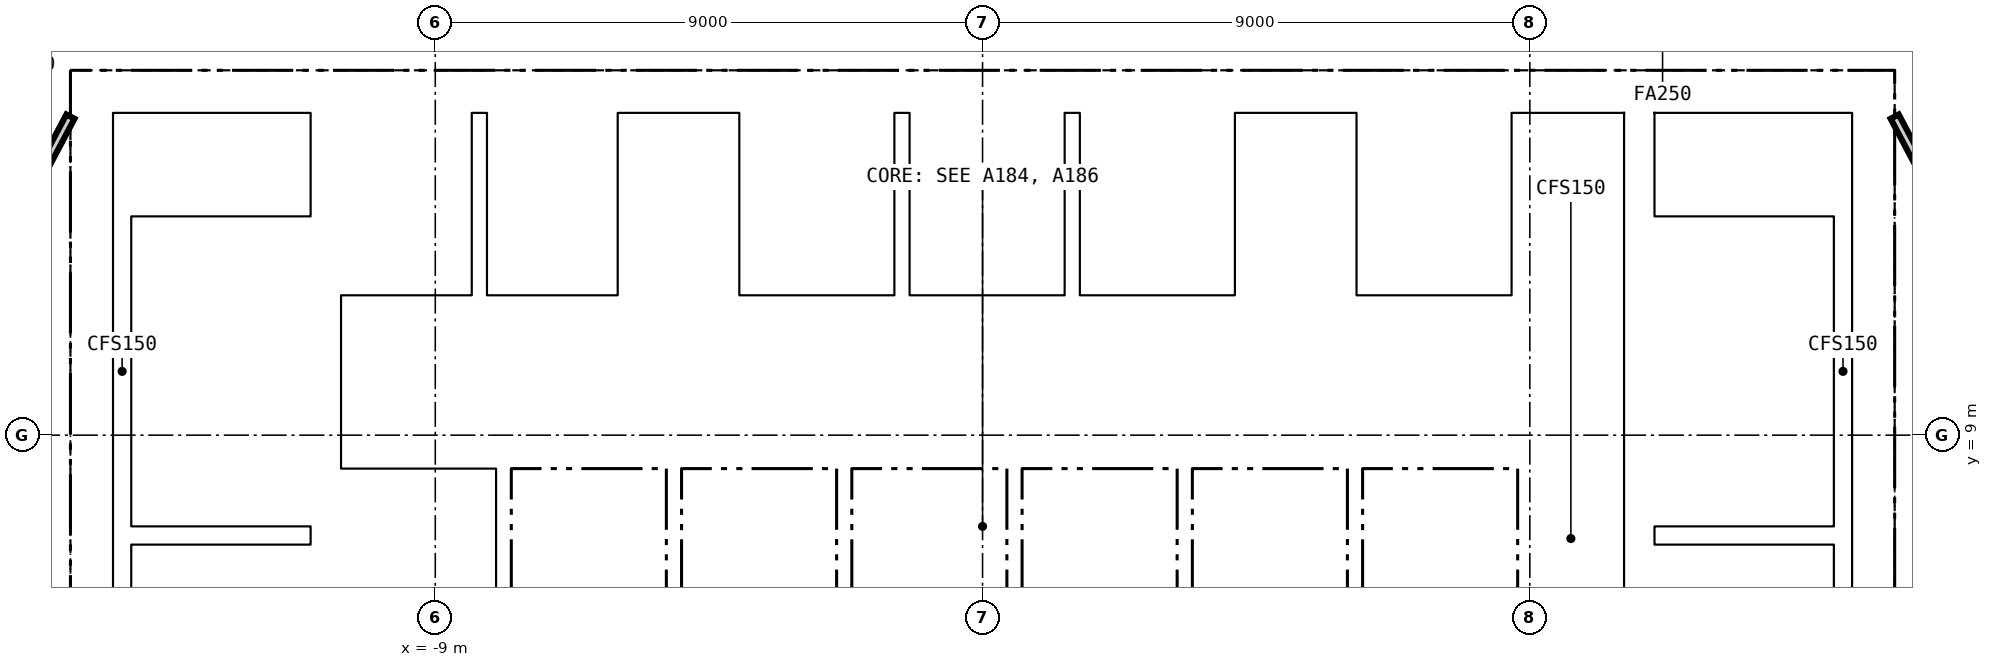
"""IFC4 building model, lengths in metres.
Left out: names, types, materials, properties, quantities, classifications, styles, units other than length and angle.
Written with IfcOpenShell. Run it as: python <this file> out.ifc"""

import sys

from ifc_helpers import new_model, si_unit, direction, frame, frame_2d, origin, place, context, subcontext, project, spatial, rectangle, extrude, element, fill, save


model = new_model("IFC4")
c1 = context("Model", 3, precision=1e-05, world=origin(), true_north=direction((0.0, 1.0)))
c2 = subcontext(c1, "Body", "Model", "MODEL_VIEW")
j1 = project(units=[si_unit("LENGTHUNIT", "METRE"), si_unit("PLANEANGLEUNIT", "RADIAN")], contexts=[c1])
p1 = place(None, origin())
s1 = spatial("IfcSite", under=j1, at=p1, CompositionType="ELEMENT")
p2 = place(p1, origin())
s2 = spatial("IfcBuilding", under=s1, at=p2, CompositionType="ELEMENT")
p3 = place(p2, frame((0.0, 0.0, 170.8)))
s3 = spatial("IfcBuildingStorey", under=s2, at=p3, CompositionType="ELEMENT", Elevation=170.8)
p4 = place(p3, frame((-15.0, 14.65, -0.15), z_axis=(0.0, 0.0, 1.0), x_axis=(1.0, 0.0, 0.0)))
e1 = element("IfcWall", 1, at=p4, inside=s3, PredefinedType="SOLIDWALL", context=c2, shape_type="SweptSolid", body=[
    extrude(rectangle(XDim=30.0, YDim=0.7, at=frame_2d((15.0, 0.0))), origin(), (0.0, 0.0, 1.0), 3.65),
])
p5 = place(p4, frame((9.25, 0.0, 0.15)))
e2 = element("IfcOpeningElement", 2, at=p5, cuts=e1, PredefinedType="OPENING", context=c2, shape_type="SweptSolid", body=[
    extrude(rectangle(XDim=1.5, YDim=2.1, at=frame_2d((0.75, 1.05))), frame((0.0, 0.36, 0.0), z_axis=(0.0, -1.0, 0.0), x_axis=(1.0, 0.0, 0.0)), (0.0, 0.0, 1.0), 0.72),
])
p6 = place(p4, frame((19.4, 0.0, 0.15)))
e3 = element("IfcOpeningElement", 3, at=p6, cuts=e1, PredefinedType="OPENING", context=c2, shape_type="SweptSolid", body=[
    extrude(rectangle(XDim=1.5, YDim=2.1, at=frame_2d((0.75, 1.05))), frame((0.0, 0.36, 0.0), z_axis=(0.0, -1.0, 0.0), x_axis=(1.0, 0.0, 0.0)), (0.0, 0.0, 1.0), 0.72),
])
p7 = place(p4, frame((1.5, 0.0, 0.15)))
e4 = element("IfcOpeningElement", 4, at=p7, cuts=e1, PredefinedType="OPENING", context=c2, shape_type="SweptSolid", body=[
    extrude(rectangle(XDim=1.2, YDim=2.1, at=frame_2d((0.6, 1.05))), frame((0.0, 0.36, 0.0), z_axis=(0.0, -1.0, 0.0), x_axis=(1.0, 0.0, 0.0)), (0.0, 0.0, 1.0), 0.72),
])
p8 = place(p4, frame((27.3, 0.0, 0.15)))
e5 = element("IfcOpeningElement", 5, at=p8, cuts=e1, PredefinedType="OPENING", context=c2, shape_type="SweptSolid", body=[
    extrude(rectangle(XDim=1.2, YDim=2.1, at=frame_2d((0.6, 1.05))), frame((0.0, 0.36, 0.0), z_axis=(0.0, -1.0, 0.0), x_axis=(1.0, 0.0, 0.0)), (0.0, 0.0, 1.0), 0.72),
])
for number, where, z_axis, x_axis in (
    (6, (-14.65, 0.7, -0.15), (0.0, 0.0, 1.0), (0.0, 1.0, 0.0)),
    (7, (14.65, 0.7, -0.15), (0.0, 0.0, 1.0), (0.0, 1.0, 0.0)),
):
    element("IfcWall", number, at=place(p3, frame(where, z_axis=z_axis, x_axis=x_axis)), inside=s3, PredefinedType="SOLIDWALL", context=c2, shape_type="SweptSolid", body=[
        extrude(rectangle(XDim=13.6, YDim=0.7, at=frame_2d((6.8, 0.0))), origin(), (0.0, 0.0, 1.0), 3.65),
    ])
for number, where, z_axis, x_axis in (
    (8, (-10.8, 0.7, -0.15), (0.0, 0.0, 1.0), (0.0, 1.0, 0.0)),
    (9, (10.8, 0.7, -0.15), (0.0, 0.0, 1.0), (0.0, 1.0, 0.0)),
):
    element("IfcWall", number, at=place(p3, frame(where, z_axis=z_axis, x_axis=x_axis)), inside=s3, PredefinedType="SOLIDWALL", context=c2, shape_type="SweptSolid", body=[
        extrude(rectangle(XDim=13.6, YDim=0.5, at=frame_2d((6.8, 0.0))), origin(), (0.0, 0.0, 1.0), 3.65),
    ])
p9 = place(p3, frame((-10.55, 8.55, 0.0), z_axis=(0.0, 0.0, 1.0), x_axis=(1.0, 0.0, 0.0)))
e10 = element("IfcWall", 10, at=p9, inside=s3, PredefinedType="PARTITIONING", context=c2, shape_type="SweptSolid", body=[
    extrude(rectangle(XDim=21.1, YDim=0.2, at=frame_2d((10.55, 0.0))), origin(), (0.0, 0.0, 1.0), 3.5),
])
p10 = place(p9, frame((0.675, 0.0, 0.0)))
e11 = element("IfcOpeningElement", 11, at=p10, cuts=e10, PredefinedType="OPENING", context=c2, shape_type="SweptSolid", body=[
    extrude(rectangle(XDim=1.2, YDim=2.1, at=frame_2d((0.6, 1.05))), frame((0.0, 0.11, 0.0), z_axis=(0.0, -1.0, 0.0), x_axis=(1.0, 0.0, 0.0)), (0.0, 0.0, 1.0), 0.22),
])
p11 = place(p9, frame((3.475, 0.0, 0.0)))
e12 = element("IfcOpeningElement", 12, at=p11, cuts=e10, PredefinedType="OPENING", context=c2, shape_type="SweptSolid", body=[
    extrude(rectangle(XDim=1.2, YDim=2.1, at=frame_2d((0.6, 1.05))), frame((0.0, 0.11, 0.0), z_axis=(0.0, -1.0, 0.0), x_axis=(1.0, 0.0, 0.0)), (0.0, 0.0, 1.0), 0.22),
])
p12 = place(p9, frame((6.275, 0.0, 0.0)))
e13 = element("IfcOpeningElement", 13, at=p12, cuts=e10, PredefinedType="OPENING", context=c2, shape_type="SweptSolid", body=[
    extrude(rectangle(XDim=1.2, YDim=2.1, at=frame_2d((0.6, 1.05))), frame((0.0, 0.11, 0.0), z_axis=(0.0, -1.0, 0.0), x_axis=(1.0, 0.0, 0.0)), (0.0, 0.0, 1.0), 0.22),
])
p13 = place(p9, frame((9.075, 0.0, 0.0)))
e14 = element("IfcOpeningElement", 14, at=p13, cuts=e10, PredefinedType="OPENING", context=c2, shape_type="SweptSolid", body=[
    extrude(rectangle(XDim=1.2, YDim=2.1, at=frame_2d((0.6, 1.05))), frame((0.0, 0.11, 0.0), z_axis=(0.0, -1.0, 0.0), x_axis=(1.0, 0.0, 0.0)), (0.0, 0.0, 1.0), 0.22),
])
p14 = place(p9, frame((11.875, 0.0, 0.0)))
e15 = element("IfcOpeningElement", 15, at=p14, cuts=e10, PredefinedType="OPENING", context=c2, shape_type="SweptSolid", body=[
    extrude(rectangle(XDim=1.2, YDim=2.1, at=frame_2d((0.6, 1.05))), frame((0.0, 0.11, 0.0), z_axis=(0.0, -1.0, 0.0), x_axis=(1.0, 0.0, 0.0)), (0.0, 0.0, 1.0), 0.22),
])
p15 = place(p9, frame((14.675, 0.0, 0.0)))
e16 = element("IfcOpeningElement", 16, at=p15, cuts=e10, PredefinedType="OPENING", context=c2, shape_type="SweptSolid", body=[
    extrude(rectangle(XDim=1.2, YDim=2.1, at=frame_2d((0.6, 1.05))), frame((0.0, 0.11, 0.0), z_axis=(0.0, -1.0, 0.0), x_axis=(1.0, 0.0, 0.0)), (0.0, 0.0, 1.0), 0.22),
])
p16 = place(p9, frame((17.475, 0.0, 0.0)))
e17 = element("IfcOpeningElement", 17, at=p16, cuts=e10, PredefinedType="OPENING", context=c2, shape_type="SweptSolid", body=[
    extrude(rectangle(XDim=1.2, YDim=2.1, at=frame_2d((0.6, 1.05))), frame((0.0, 0.11, 0.0), z_axis=(0.0, -1.0, 0.0), x_axis=(1.0, 0.0, 0.0)), (0.0, 0.0, 1.0), 0.22),
])
p17 = place(p9, frame((19.9, 0.0, 0.0)))
e18 = element("IfcOpeningElement", 18, at=p17, cuts=e10, PredefinedType="OPENING", context=c2, shape_type="SweptSolid", body=[
    extrude(rectangle(XDim=0.9, YDim=2.1, at=frame_2d((0.45, 1.05))), frame((0.0, 0.11, 0.0), z_axis=(0.0, -1.0, 0.0), x_axis=(1.0, 0.0, 0.0)), (0.0, 0.0, 1.0), 0.22),
])
p18 = place(p3, frame((-10.55, 11.2, 0.0), z_axis=(0.0, 0.0, 1.0), x_axis=(1.0, 0.0, 0.0)))
e19 = element("IfcWall", 19, at=p18, inside=s3, PredefinedType="PARTITIONING", context=c2, shape_type="SweptSolid", body=[
    extrude(rectangle(XDim=4.8, YDim=0.2, at=frame_2d((2.4, 0.0))), origin(), (0.0, 0.0, 1.0), 3.5),
])
p19 = place(p18, frame((0.525, 0.0, 0.0)))
e20 = element("IfcOpeningElement", 20, at=p19, cuts=e19, PredefinedType="OPENING", context=c2, shape_type="SweptSolid", body=[
    extrude(rectangle(XDim=1.1, YDim=2.1, at=frame_2d((0.55, 1.05))), frame((0.0, 0.11, 0.0), z_axis=(0.0, -1.0, 0.0), x_axis=(1.0, 0.0, 0.0)), (0.0, 0.0, 1.0), 0.22),
])
p20 = place(p18, frame((2.925, 0.0, 0.0)))
e21 = element("IfcOpeningElement", 21, at=p20, cuts=e19, PredefinedType="OPENING", context=c2, shape_type="SweptSolid", body=[
    extrude(rectangle(XDim=1.1, YDim=2.1, at=frame_2d((0.55, 1.05))), frame((0.0, 0.11, 0.0), z_axis=(0.0, -1.0, 0.0), x_axis=(1.0, 0.0, 0.0)), (0.0, 0.0, 1.0), 0.22),
])
p21 = place(p3, frame((-4.25, 11.2, 0.0), z_axis=(0.0, 0.0, 1.0), x_axis=(1.0, 0.0, 0.0)))
e22 = element("IfcWall", 22, at=p21, inside=s3, PredefinedType="PARTITIONING", context=c2, shape_type="SweptSolid", body=[
    extrude(rectangle(XDim=8.65, YDim=0.2, at=frame_2d((4.325, 0.0))), origin(), (0.0, 0.0, 1.0), 3.5),
])
p22 = place(p21, frame((0.825, 0.0, 0.0)))
e23 = element("IfcOpeningElement", 23, at=p22, cuts=e22, PredefinedType="OPENING", context=c2, shape_type="SweptSolid", body=[
    extrude(rectangle(XDim=1.4, YDim=2.1, at=frame_2d((0.7, 1.05))), frame((0.0, 0.11, 0.0), z_axis=(0.0, -1.0, 0.0), x_axis=(1.0, 0.0, 0.0)), (0.0, 0.0, 1.0), 0.22),
])
p23 = place(p21, frame((3.625, 0.0, 0.0)))
e24 = element("IfcOpeningElement", 24, at=p23, cuts=e22, PredefinedType="OPENING", context=c2, shape_type="SweptSolid", body=[
    extrude(rectangle(XDim=1.4, YDim=2.1, at=frame_2d((0.7, 1.05))), frame((0.0, 0.11, 0.0), z_axis=(0.0, -1.0, 0.0), x_axis=(1.0, 0.0, 0.0)), (0.0, 0.0, 1.0), 0.22),
])
p24 = place(p3, frame((5.9, 11.2, 0.0), z_axis=(0.0, 0.0, 1.0), x_axis=(1.0, 0.0, 0.0)))
e25 = element("IfcWall", 25, at=p24, inside=s3, PredefinedType="PARTITIONING", context=c2, shape_type="SweptSolid", body=[
    extrude(rectangle(XDim=4.65, YDim=0.2, at=frame_2d((2.325, 0.0))), origin(), (0.0, 0.0, 1.0), 3.5),
])
p25 = place(p24, frame((3.4, 0.0, 0.0)))
e26 = element("IfcOpeningElement", 26, at=p25, cuts=e25, PredefinedType="OPENING", context=c2, shape_type="SweptSolid", body=[
    extrude(rectangle(XDim=0.9, YDim=2.1, at=frame_2d((0.45, 1.05))), frame((0.0, 0.11, 0.0), z_axis=(0.0, -1.0, 0.0), x_axis=(1.0, 0.0, 0.0)), (0.0, 0.0, 1.0), 0.22),
])
p26 = place(p3, frame((-4.125, 8.65, 0.0), z_axis=(0.0, 0.0, 1.0), x_axis=(0.0, 1.0, 0.0)))
e27 = element("IfcWall", 27, at=p26, inside=s3, PredefinedType="PARTITIONING", context=c2, shape_type="SweptSolid", body=[
    extrude(rectangle(XDim=2.45, YDim=0.25, at=frame_2d((1.225, 0.0))), origin(), (0.0, 0.0, 1.0), 3.5),
])
p27 = place(p26, frame((0.625, 0.0, 0.0)))
e28 = element("IfcOpeningElement", 28, at=p27, cuts=e27, PredefinedType="OPENING", context=c2, shape_type="SweptSolid", body=[
    extrude(rectangle(XDim=1.2, YDim=2.1, at=frame_2d((0.6, 1.05))), frame((0.0, 0.135, 0.0), z_axis=(0.0, -1.0, 0.0), x_axis=(1.0, 0.0, 0.0)), (0.0, 0.0, 1.0), 0.27),
])
for number, where, z_axis, x_axis in (
    (29, (-7.875, 6.15, 0.0), (0.0, 0.0, 1.0), (0.0, 1.0, 0.0)),
    (30, (-5.075, 6.15, 0.0), (0.0, 0.0, 1.0), (0.0, 1.0, 0.0)),
    (31, (-2.275, 6.15, 0.0), (0.0, 0.0, 1.0), (0.0, 1.0, 0.0)),
    (32, (0.525, 6.15, 0.0), (0.0, 0.0, 1.0), (0.0, 1.0, 0.0)),
    (33, (3.325, 6.15, 0.0), (0.0, 0.0, 1.0), (0.0, 1.0, 0.0)),
    (34, (6.125, 6.15, 0.0), (0.0, 0.0, 1.0), (0.0, 1.0, 0.0)),
    (35, (8.925, 6.15, 0.0), (0.0, 0.0, 1.0), (0.0, 1.0, 0.0)),
):
    element("IfcWall", number, at=place(p3, frame(where, z_axis=z_axis, x_axis=x_axis)), inside=s3, PredefinedType="PARTITIONING", context=c2, shape_type="SweptSolid", body=[
        extrude(rectangle(XDim=2.3, YDim=0.25, at=frame_2d((1.15, 0.0))), origin(), (0.0, 0.0, 1.0), 3.5),
    ])
for number, where, z_axis, x_axis in (
    (36, (-8.275, 11.3, 0.0), (0.0, 0.0, 1.0), (0.0, 1.0, 0.0)),
    (37, (-5.875, 11.3, 0.0), (0.0, 0.0, 1.0), (0.0, 1.0, 0.0)),
    (38, (-4.125, 11.3, 0.0), (0.0, 0.0, 1.0), (0.0, 1.0, 0.0)),
    (39, (-1.325, 11.3, 0.0), (0.0, 0.0, 1.0), (0.0, 1.0, 0.0)),
    (40, (1.475, 11.3, 0.0), (0.0, 0.0, 1.0), (0.0, 1.0, 0.0)),
    (41, (4.275, 11.3, 0.0), (0.0, 0.0, 1.0), (0.0, 1.0, 0.0)),
    (42, (6.025, 11.3, 0.0), (0.0, 0.0, 1.0), (0.0, 1.0, 0.0)),
    (43, (8.825, 11.3, 0.0), (0.0, 0.0, 1.0), (0.0, 1.0, 0.0)),
):
    element("IfcWall", number, at=place(p3, frame(where, z_axis=z_axis, x_axis=x_axis)), inside=s3, PredefinedType="PARTITIONING", context=c2, shape_type="SweptSolid", body=[
        extrude(rectangle(XDim=3.0, YDim=0.25, at=frame_2d((1.5, 0.0))), origin(), (0.0, 0.0, 1.0), 3.5),
    ])
p28 = place(p3, frame((-14.0, 7.35, 0.0), z_axis=(0.0, 0.0, 1.0), x_axis=(1.0, 0.0, 0.0)))
e44 = element("IfcWall", 44, at=p28, inside=s3, PredefinedType="SOLIDWALL", context=c2, shape_type="SweptSolid", body=[
    extrude(rectangle(XDim=2.95, YDim=0.3, at=frame_2d((1.475, 0.0))), origin(), (0.0, 0.0, 1.0), 3.5),
])
p29 = place(p3, frame((-14.15, 0.7, 0.0), z_axis=(0.0, 0.0, 1.0), x_axis=(0.0, 1.0, 0.0)))
e45 = element("IfcWall", 45, at=p29, inside=s3, PredefinedType="SOLIDWALL", context=c2, shape_type="SweptSolid", body=[
    extrude(rectangle(XDim=13.6, YDim=0.3, at=frame_2d((6.8, 0.0))), origin(), (0.0, 0.0, 1.0), 3.5),
])
p30 = place(p3, frame((11.05, 7.35, 0.0), z_axis=(0.0, 0.0, 1.0), x_axis=(1.0, 0.0, 0.0)))
e46 = element("IfcWall", 46, at=p30, inside=s3, PredefinedType="SOLIDWALL", context=c2, shape_type="SweptSolid", body=[
    extrude(rectangle(XDim=2.95, YDim=0.3, at=frame_2d((1.475, 0.0))), origin(), (0.0, 0.0, 1.0), 3.5),
])
p31 = place(p3, frame((14.15, 0.7, 0.0), z_axis=(0.0, 0.0, 1.0), x_axis=(0.0, 1.0, 0.0)))
e47 = element("IfcWall", 47, at=p31, inside=s3, PredefinedType="SOLIDWALL", context=c2, shape_type="SweptSolid", body=[
    extrude(rectangle(XDim=13.6, YDim=0.3, at=frame_2d((6.8, 0.0))), origin(), (0.0, 0.0, 1.0), 3.5),
])
p32 = place(p3, frame((-15.0, 14.239, 0.0), z_axis=(0.0, 0.0, 1.0), x_axis=(-0.467834708812, -0.88381597928, 0.0)))
e48 = element("IfcWall", 48, at=p32, inside=s3, PredefinedType="PARTITIONING", context=c2, shape_type="SweptSolid", body=[
    extrude(rectangle(XDim=7.406, YDim=0.15, at=frame_2d((3.703, 0.0))), origin(), (0.0, 0.0, 1.0), 2.741),
])
p33 = place(p32, frame((3.203, 0.0, 0.0)))
e49 = element("IfcOpeningElement", 49, at=p33, cuts=e48, PredefinedType="OPENING", context=c2, shape_type="SweptSolid", body=[
    extrude(rectangle(XDim=1.0, YDim=2.1, at=frame_2d((0.5, 1.05))), frame((0.0, 0.085, 0.0), z_axis=(0.0, -1.0, 0.0), x_axis=(1.0, 0.0, 0.0)), (0.0, 0.0, 1.0), 0.17),
])
p34 = place(p3, frame((18.5, 7.627, 0.0), z_axis=(0.0, 0.0, 1.0), x_axis=(-0.467835241243, 0.883815697446, 0.0)))
e50 = element("IfcWall", 50, at=p34, inside=s3, PredefinedType="PARTITIONING", context=c2, shape_type="SweptSolid", body=[
    extrude(rectangle(XDim=7.481, YDim=0.15, at=frame_2d((3.741, 0.0))), origin(), (0.0, 0.0, 1.0), 2.741),
])
p35 = place(p34, frame((3.24, 0.0, 0.0)))
e51 = element("IfcOpeningElement", 51, at=p35, cuts=e50, PredefinedType="OPENING", context=c2, shape_type="SweptSolid", body=[
    extrude(rectangle(XDim=1.0, YDim=2.1, at=frame_2d((0.5, 1.05))), frame((0.0, 0.085, 0.0), z_axis=(0.0, -1.0, 0.0), x_axis=(1.0, 0.0, 0.0)), (0.0, 0.0, 1.0), 0.17),
])
p36 = place(p27, origin())
e52 = element("IfcDoor", 52, at=p36, inside=s3, OperationType="SINGLE_SWING_LEFT", PredefinedType="DOOR", context=c2, shape_type="SweptSolid", body=[
    extrude(rectangle(XDim=1.2, YDim=2.1, at=frame_2d((0.6, 1.05))), frame((0.0, 0.025, 0.0), z_axis=(0.0, -1.0, 0.0), x_axis=(1.0, 0.0, 0.0)), (0.0, 0.0, 1.0), 0.05),
])
fill(e28, e52)
p37 = place(p10, origin())
e53 = element("IfcDoor", 53, at=p37, inside=s3, OperationType="DOUBLE_DOOR_SLIDING", PredefinedType="DOOR", context=c2, shape_type="SweptSolid", body=[
    extrude(rectangle(XDim=1.2, YDim=2.1, at=frame_2d((0.6, 1.05))), frame((0.0, 0.025, 0.0), z_axis=(0.0, -1.0, 0.0), x_axis=(1.0, 0.0, 0.0)), (0.0, 0.0, 1.0), 0.05),
])
fill(e11, e53)
p38 = place(p11, origin())
e54 = element("IfcDoor", 54, at=p38, inside=s3, OperationType="DOUBLE_DOOR_SLIDING", PredefinedType="DOOR", context=c2, shape_type="SweptSolid", body=[
    extrude(rectangle(XDim=1.2, YDim=2.1, at=frame_2d((0.6, 1.05))), frame((0.0, 0.025, 0.0), z_axis=(0.0, -1.0, 0.0), x_axis=(1.0, 0.0, 0.0)), (0.0, 0.0, 1.0), 0.05),
])
fill(e12, e54)
p39 = place(p12, origin())
e55 = element("IfcDoor", 55, at=p39, inside=s3, OperationType="DOUBLE_DOOR_SLIDING", PredefinedType="DOOR", context=c2, shape_type="SweptSolid", body=[
    extrude(rectangle(XDim=1.2, YDim=2.1, at=frame_2d((0.6, 1.05))), frame((0.0, 0.025, 0.0), z_axis=(0.0, -1.0, 0.0), x_axis=(1.0, 0.0, 0.0)), (0.0, 0.0, 1.0), 0.05),
])
fill(e13, e55)
p40 = place(p13, origin())
e56 = element("IfcDoor", 56, at=p40, inside=s3, OperationType="DOUBLE_DOOR_SLIDING", PredefinedType="DOOR", context=c2, shape_type="SweptSolid", body=[
    extrude(rectangle(XDim=1.2, YDim=2.1, at=frame_2d((0.6, 1.05))), frame((0.0, 0.025, 0.0), z_axis=(0.0, -1.0, 0.0), x_axis=(1.0, 0.0, 0.0)), (0.0, 0.0, 1.0), 0.05),
])
fill(e14, e56)
p41 = place(p14, origin())
e57 = element("IfcDoor", 57, at=p41, inside=s3, OperationType="DOUBLE_DOOR_SLIDING", PredefinedType="DOOR", context=c2, shape_type="SweptSolid", body=[
    extrude(rectangle(XDim=1.2, YDim=2.1, at=frame_2d((0.6, 1.05))), frame((0.0, 0.025, 0.0), z_axis=(0.0, -1.0, 0.0), x_axis=(1.0, 0.0, 0.0)), (0.0, 0.0, 1.0), 0.05),
])
fill(e15, e57)
p42 = place(p15, origin())
e58 = element("IfcDoor", 58, at=p42, inside=s3, OperationType="DOUBLE_DOOR_SLIDING", PredefinedType="DOOR", context=c2, shape_type="SweptSolid", body=[
    extrude(rectangle(XDim=1.2, YDim=2.1, at=frame_2d((0.6, 1.05))), frame((0.0, 0.025, 0.0), z_axis=(0.0, -1.0, 0.0), x_axis=(1.0, 0.0, 0.0)), (0.0, 0.0, 1.0), 0.05),
])
fill(e16, e58)
p43 = place(p16, origin())
e59 = element("IfcDoor", 59, at=p43, inside=s3, OperationType="DOUBLE_DOOR_SLIDING", PredefinedType="DOOR", context=c2, shape_type="SweptSolid", body=[
    extrude(rectangle(XDim=1.2, YDim=2.1, at=frame_2d((0.6, 1.05))), frame((0.0, 0.025, 0.0), z_axis=(0.0, -1.0, 0.0), x_axis=(1.0, 0.0, 0.0)), (0.0, 0.0, 1.0), 0.05),
])
fill(e17, e59)
p44 = place(p17, origin())
e60 = element("IfcDoor", 60, at=p44, inside=s3, OperationType="SINGLE_SWING_RIGHT", PredefinedType="DOOR", context=c2, shape_type="SweptSolid", body=[
    extrude(rectangle(XDim=0.9, YDim=2.1, at=frame_2d((0.45, 1.05))), frame((0.0, 0.025, 0.0), z_axis=(0.0, -1.0, 0.0), x_axis=(1.0, 0.0, 0.0)), (0.0, 0.0, 1.0), 0.05),
])
fill(e18, e60)
p45 = place(p19, origin())
e61 = element("IfcDoor", 61, at=p45, inside=s3, OperationType="DOUBLE_DOOR_SLIDING", PredefinedType="DOOR", context=c2, shape_type="SweptSolid", body=[
    extrude(rectangle(XDim=1.1, YDim=2.1, at=frame_2d((0.55, 1.05))), frame((0.0, 0.025, 0.0), z_axis=(0.0, -1.0, 0.0), x_axis=(1.0, 0.0, 0.0)), (0.0, 0.0, 1.0), 0.05),
])
fill(e20, e61)
p46 = place(p20, origin())
e62 = element("IfcDoor", 62, at=p46, inside=s3, OperationType="DOUBLE_DOOR_SLIDING", PredefinedType="DOOR", context=c2, shape_type="SweptSolid", body=[
    extrude(rectangle(XDim=1.1, YDim=2.1, at=frame_2d((0.55, 1.05))), frame((0.0, 0.025, 0.0), z_axis=(0.0, -1.0, 0.0), x_axis=(1.0, 0.0, 0.0)), (0.0, 0.0, 1.0), 0.05),
])
fill(e21, e62)
p47 = place(p22, origin())
e63 = element("IfcDoor", 63, at=p47, inside=s3, OperationType="DOUBLE_DOOR_SLIDING", PredefinedType="DOOR", context=c2, shape_type="SweptSolid", body=[
    extrude(rectangle(XDim=1.4, YDim=2.1, at=frame_2d((0.7, 1.05))), frame((0.0, 0.025, 0.0), z_axis=(0.0, -1.0, 0.0), x_axis=(1.0, 0.0, 0.0)), (0.0, 0.0, 1.0), 0.05),
])
fill(e23, e63)
p48 = place(p23, origin())
e64 = element("IfcDoor", 64, at=p48, inside=s3, OperationType="DOUBLE_DOOR_SLIDING", PredefinedType="DOOR", context=c2, shape_type="SweptSolid", body=[
    extrude(rectangle(XDim=1.4, YDim=2.1, at=frame_2d((0.7, 1.05))), frame((0.0, 0.025, 0.0), z_axis=(0.0, -1.0, 0.0), x_axis=(1.0, 0.0, 0.0)), (0.0, 0.0, 1.0), 0.05),
])
fill(e24, e64)
p49 = place(p25, origin())
e65 = element("IfcDoor", 65, at=p49, inside=s3, OperationType="SINGLE_SWING_LEFT", PredefinedType="DOOR", context=c2, shape_type="SweptSolid", body=[
    extrude(rectangle(XDim=0.9, YDim=2.1, at=frame_2d((0.45, 1.05))), frame((0.0, 0.025, 0.0), z_axis=(0.0, -1.0, 0.0), x_axis=(1.0, 0.0, 0.0)), (0.0, 0.0, 1.0), 0.05),
])
fill(e26, e65)
p50 = place(p5, origin())
e66 = element("IfcDoor", 66, at=p50, inside=s3, OperationType="DOUBLE_DOOR_SINGLE_SWING", PredefinedType="DOOR", context=c2, shape_type="SweptSolid", body=[
    extrude(rectangle(XDim=1.5, YDim=2.1, at=frame_2d((0.75, 1.05))), frame((0.0, 0.025, 0.0), z_axis=(0.0, -1.0, 0.0), x_axis=(1.0, 0.0, 0.0)), (0.0, 0.0, 1.0), 0.05),
])
fill(e2, e66)
p51 = place(p6, origin())
e67 = element("IfcDoor", 67, at=p51, inside=s3, OperationType="DOUBLE_DOOR_SINGLE_SWING", PredefinedType="DOOR", context=c2, shape_type="SweptSolid", body=[
    extrude(rectangle(XDim=1.5, YDim=2.1, at=frame_2d((0.75, 1.05))), frame((0.0, 0.025, 0.0), z_axis=(0.0, -1.0, 0.0), x_axis=(1.0, 0.0, 0.0)), (0.0, 0.0, 1.0), 0.05),
])
fill(e3, e67)
p52 = place(p7, origin())
e68 = element("IfcDoor", 68, at=p52, inside=s3, OperationType="SINGLE_SWING_RIGHT", PredefinedType="DOOR", context=c2, shape_type="SweptSolid", body=[
    extrude(rectangle(XDim=1.2, YDim=2.1, at=frame_2d((0.6, 1.05))), frame((0.0, 0.025, 0.0), z_axis=(0.0, -1.0, 0.0), x_axis=(1.0, 0.0, 0.0)), (0.0, 0.0, 1.0), 0.05),
])
fill(e4, e68)
p53 = place(p8, origin())
e69 = element("IfcDoor", 69, at=p53, inside=s3, OperationType="SINGLE_SWING_LEFT", PredefinedType="DOOR", context=c2, shape_type="SweptSolid", body=[
    extrude(rectangle(XDim=1.2, YDim=2.1, at=frame_2d((0.6, 1.05))), frame((0.0, 0.025, 0.0), z_axis=(0.0, -1.0, 0.0), x_axis=(1.0, 0.0, 0.0)), (0.0, 0.0, 1.0), 0.05),
])
fill(e5, e69)
save(model, sys.argv[1])
